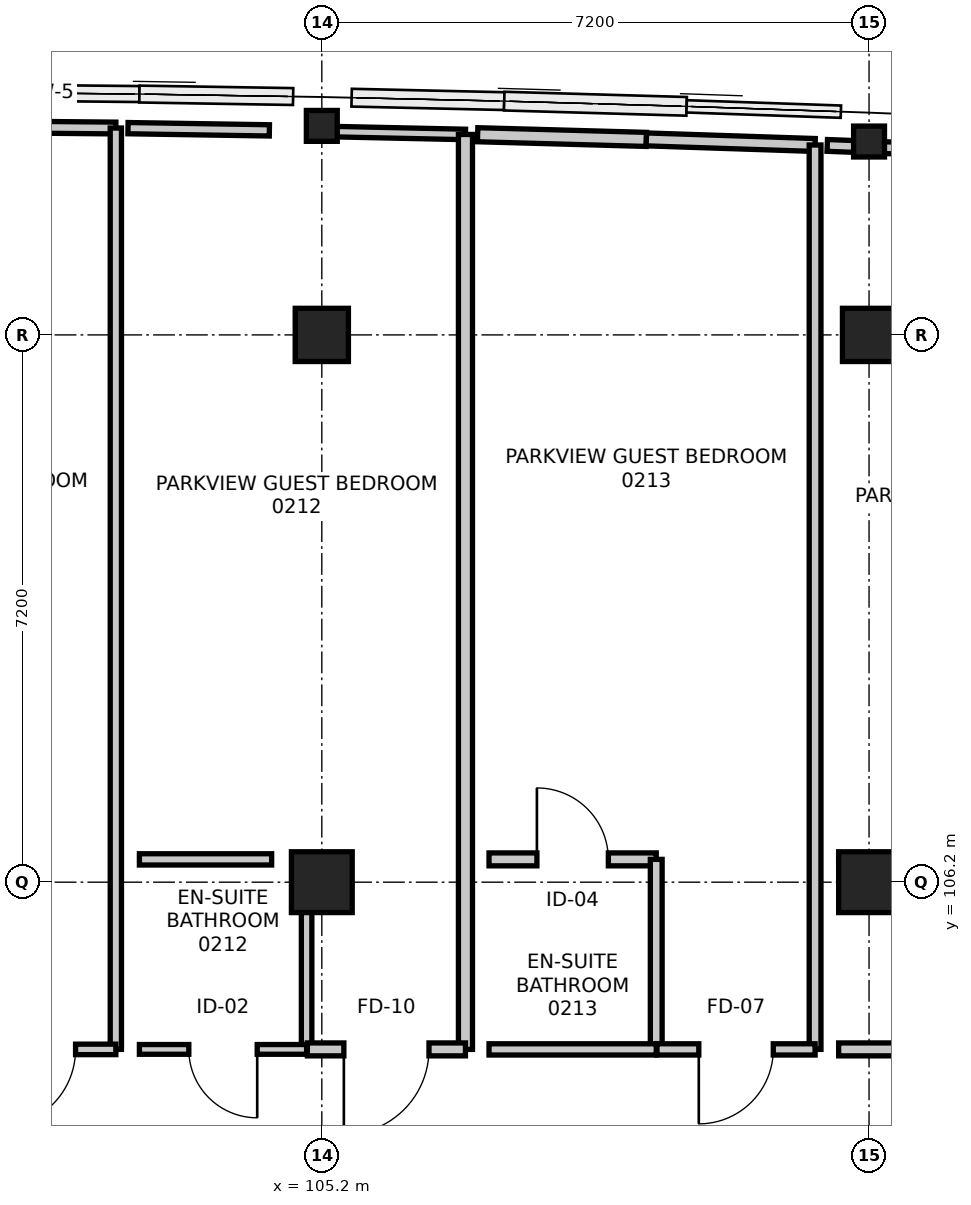
"""IFC4 building model, lengths in metres.
Left out: names, types, materials, properties, quantities, classifications, styles, units other than length and angle.
Written with IfcOpenShell. Run it as: python <this file> out.ifc"""

import sys

from ifc_helpers import new_model, si_unit, direction, frame, frame_2d, origin, origin_2d, place, context, subcontext, project, spatial, rectangle, hollow_circle, extrude, element, fill, save


model = new_model("IFC4")
c1 = context("Model", 3, precision=1e-05, world=origin(), true_north=direction((0.0, 1.0)))
c2 = subcontext(c1, "Body", "Model", "MODEL_VIEW")
j1 = project(units=[si_unit("LENGTHUNIT", "METRE"), si_unit("PLANEANGLEUNIT", "RADIAN")], contexts=[c1])
p1 = place(None, origin())
s1 = spatial("IfcSite", under=j1, at=p1, CompositionType="ELEMENT")
p2 = place(p1, origin())
s2 = spatial("IfcBuilding", under=s1, at=p2, CompositionType="ELEMENT")
p3 = place(p2, frame((0.0, 0.0, 10.5)))
s3 = spatial("IfcBuildingStorey", under=s2, at=p3, CompositionType="ELEMENT", Elevation=10.5)
p4 = place(p3, frame((105.2, 106.2, 0.0), z_axis=(0.0, 0.0, 1.0), x_axis=(1.0, 0.0, 0.0)))
e1 = element("IfcColumn", 1, at=p4, inside=s3, PredefinedType="COLUMN", context=c2, shape_type="SweptSolid", body=[
    extrude(rectangle(XDim=0.8, YDim=0.8, at=origin_2d()), origin(), (0.0, 0.0, 1.0), 4.5),
])
p5 = place(p3, frame((105.2, 113.4, 0.0), z_axis=(0.0, 0.0, 1.0), x_axis=(1.0, 0.0, 0.0)))
e2 = element("IfcColumn", 2, at=p5, inside=s3, PredefinedType="COLUMN", context=c2, shape_type="SweptSolid", body=[
    extrude(rectangle(XDim=0.7, YDim=0.7, at=origin_2d()), origin(), (0.0, 0.0, 1.0), 4.5),
])
p6 = place(p3, frame((105.2, 116.15, 0.0), z_axis=(0.0, 0.0, 1.0), x_axis=(1.0, 0.0, 0.0)))
e3 = element("IfcColumn", 3, at=p6, inside=s3, PredefinedType="COLUMN", context=c2, shape_type="SweptSolid", body=[
    extrude(hollow_circle(Radius=0.203, WallThickness=0.02, at=origin_2d()), origin(), (0.0, 0.0, 1.0), 4.5),
])
p7 = place(p3, frame((112.4, 106.2, -0.32), z_axis=(0.0, 0.0, 1.0), x_axis=(1.0, 0.0, 0.0)))
e4 = element("IfcColumn", 4, at=p7, inside=s3, PredefinedType="COLUMN", context=c2, shape_type="SweptSolid", body=[
    extrude(rectangle(XDim=0.8, YDim=0.8, at=origin_2d()), origin(), (0.0, 0.0, 1.0), 4.82),
])
p8 = place(p3, frame((112.4, 113.4, 0.0), z_axis=(0.0, 0.0, 1.0), x_axis=(1.0, 0.0, 0.0)))
e5 = element("IfcColumn", 5, at=p8, inside=s3, PredefinedType="COLUMN", context=c2, shape_type="SweptSolid", body=[
    extrude(rectangle(XDim=0.7, YDim=0.7, at=origin_2d()), origin(), (0.0, 0.0, 1.0), 4.5),
])
p9 = place(p3, frame((112.4, 115.944, 0.0), z_axis=(0.0, 0.0, 1.0), x_axis=(1.0, 0.0, 0.0)))
e6 = element("IfcColumn", 6, at=p9, inside=s3, PredefinedType="COLUMN", context=c2, shape_type="SweptSolid", body=[
    extrude(hollow_circle(Radius=0.203, WallThickness=0.02, at=origin_2d()), origin(), (0.0, 0.0, 1.0), 4.5),
])
p10 = place(p3, frame((100.27, 116.143, 0.0), z_axis=(0.0, 0.0, 1.0), x_axis=(0.999956311713, -0.009347441603, 0.0)))
e7 = element("IfcWall", 7, at=p10, inside=s3, PredefinedType="PARTITIONING", context=c2, shape_type="SweptSolid", body=[
    extrude(rectangle(XDim=2.22, YDim=0.155, at=frame_2d((1.11, 0.0))), origin(), (0.0, 0.0, 1.0), 3.796),
])
p11 = place(p3, frame((102.49, 116.122, 0.0), z_axis=(0.0, 0.0, 1.0), x_axis=(0.0, -1.0, 0.0)))
e8 = element("IfcWall", 8, at=p11, inside=s3, PredefinedType="PARTITIONING", context=c2, shape_type="SweptSolid", body=[
    extrude(rectangle(XDim=12.122, YDim=0.148, at=frame_2d((6.061, 0.0))), origin(), (0.0, 0.0, 1.0), 3.455),
])
p12 = place(p3, frame((102.49, 104.0, 0.0), z_axis=(0.0, 0.0, 1.0), x_axis=(-1.0, 0.0, 0.0)))
e9 = element("IfcWall", 9, at=p12, inside=s3, PredefinedType="PARTITIONING", context=c2, shape_type="SweptSolid", body=[
    extrude(rectangle(XDim=2.08, YDim=0.138, at=frame_2d((1.04, 0.0))), origin(), (0.0, 0.0, 1.0), 4.22),
])
p13 = place(p12, frame((0.53, 0.0, 0.0)))
e10 = element("IfcOpeningElement", 10, at=p13, cuts=e9, PredefinedType="OPENING", context=c2, shape_type="SweptSolid", body=[
    extrude(rectangle(XDim=1.02, YDim=2.15, at=frame_2d((0.51, 1.075))), frame((0.0, 0.079, 0.0), z_axis=(0.0, -1.0, 0.0), x_axis=(1.0, 0.0, 0.0)), (0.0, 0.0, 1.0), 0.158),
])
p14 = place(p3, frame((102.8, 106.5, 0.0), z_axis=(0.0, 0.0, 1.0), x_axis=(1.0, 0.0, 0.0)))
e11 = element("IfcWall", 11, at=p14, inside=s3, PredefinedType="PARTITIONING", context=c2, shape_type="SweptSolid", body=[
    extrude(rectangle(XDim=1.74, YDim=0.148, at=frame_2d((0.87, 0.0))), origin(), (0.0, 0.0, 1.0), 3.455),
])
p15 = place(p3, frame((105.0, 106.04, 0.0), z_axis=(0.0, 0.0, 1.0), x_axis=(0.0, -1.0, 0.0)))
e12 = element("IfcWall", 12, at=p15, inside=s3, PredefinedType="PARTITIONING", context=c2, shape_type="SweptSolid", body=[
    extrude(rectangle(XDim=2.04, YDim=0.138, at=frame_2d((1.02, 0.0))), origin(), (0.0, 0.0, 1.0), 3.555),
])
p16 = place(p3, frame((105.0, 104.0, 0.0), z_axis=(0.0, 0.0, 1.0), x_axis=(-1.0, 0.0, 0.0)))
e13 = element("IfcWall", 13, at=p16, inside=s3, PredefinedType="PARTITIONING", context=c2, shape_type="SweptSolid", body=[
    extrude(rectangle(XDim=2.2, YDim=0.128, at=frame_2d((1.1, 0.0))), origin(), (0.0, 0.0, 1.0), 3.555),
])
p17 = place(p16, frame((0.65, 0.0, 0.0)))
e14 = element("IfcOpeningElement", 14, at=p17, cuts=e13, PredefinedType="OPENING", context=c2, shape_type="SweptSolid", body=[
    extrude(rectangle(XDim=0.9, YDim=2.08, at=frame_2d((0.45, 1.04))), frame((0.0, 0.074, 0.0), z_axis=(0.0, -1.0, 0.0), x_axis=(1.0, 0.0, 0.0)), (0.0, 0.0, 1.0), 0.148),
])
p18 = place(p3, frame((102.65, 116.12, 0.0), z_axis=(0.0, 0.0, 1.0), x_axis=(0.999875990271, -0.015748145273, 0.0)))
e15 = element("IfcWall", 15, at=p18, inside=s3, PredefinedType="PARTITIONING", context=c2, shape_type="SweptSolid", body=[
    extrude(rectangle(XDim=1.86, YDim=0.148, at=frame_2d((0.93, 0.0))), origin(), (0.0, 0.0, 1.0), 3.796),
])
p19 = place(p3, frame((105.23, 116.077, 0.0), z_axis=(0.0, 0.0, 1.0), x_axis=(0.99976558294, -0.021651308726, 0.0)))
e16 = element("IfcWall", 16, at=p19, inside=s3, PredefinedType="PARTITIONING", context=c2, shape_type="SweptSolid", body=[
    extrude(rectangle(XDim=1.861, YDim=0.138, at=frame_2d((0.93, 0.0))), origin(), (0.0, 0.0, 1.0), 3.796),
])
p20 = place(p3, frame((107.09, 116.037, 0.0), z_axis=(0.0, 0.0, 1.0), x_axis=(0.0, -1.0, 0.0)))
e17 = element("IfcWall", 17, at=p20, inside=s3, PredefinedType="PARTITIONING", context=c2, shape_type="SweptSolid", body=[
    extrude(rectangle(XDim=12.037, YDim=0.185, at=frame_2d((6.019, 0.0))), origin(), (0.0, 0.0, 1.0), 3.455),
])
p21 = place(p3, frame((107.09, 104.0, 0.0), z_axis=(0.0, 0.0, 1.0), x_axis=(-1.0, 0.0, 0.0)))
e18 = element("IfcWall", 18, at=p21, inside=s3, PredefinedType="PARTITIONING", context=c2, shape_type="SweptSolid", body=[
    extrude(rectangle(XDim=2.08, YDim=0.17, at=frame_2d((1.04, 0.0))), origin(), (0.0, 0.0, 1.0), 3.555),
])
p22 = place(p21, frame((0.48, 0.0, 0.0)))
e19 = element("IfcOpeningElement", 19, at=p22, cuts=e18, PredefinedType="OPENING", context=c2, shape_type="SweptSolid", body=[
    extrude(rectangle(XDim=1.12, YDim=2.2, at=frame_2d((0.56, 1.1))), frame((0.0, 0.095, 0.0), z_axis=(0.0, -1.0, 0.0), x_axis=(1.0, 0.0, 0.0)), (0.0, 0.0, 1.0), 0.19),
])
p23 = place(p3, frame((107.4, 106.5, 0.0), z_axis=(0.0, 0.0, 1.0), x_axis=(1.0, 0.0, 0.0)))
e20 = element("IfcWall", 20, at=p23, inside=s3, PredefinedType="PARTITIONING", context=c2, shape_type="SweptSolid", body=[
    extrude(rectangle(XDim=2.2, YDim=0.17, at=frame_2d((1.1, 0.0))), origin(), (0.0, 0.0, 1.0), 3.455),
])
p24 = place(p23, frame((0.63, 0.0, 0.0)))
e21 = element("IfcOpeningElement", 21, at=p24, cuts=e20, PredefinedType="OPENING", context=c2, shape_type="SweptSolid", body=[
    extrude(rectangle(XDim=0.94, YDim=2.12, at=frame_2d((0.47, 1.06))), frame((0.0, 0.095, 0.0), z_axis=(0.0, -1.0, 0.0), x_axis=(1.0, 0.0, 0.0)), (0.0, 0.0, 1.0), 0.19),
])
p25 = place(p3, frame((109.6, 106.5, 0.0), z_axis=(0.0, 0.0, 1.0), x_axis=(0.0, -1.0, 0.0)))
e22 = element("IfcWall", 22, at=p25, inside=s3, PredefinedType="PARTITIONING", context=c2, shape_type="SweptSolid", body=[
    extrude(rectangle(XDim=2.5, YDim=0.155, at=frame_2d((1.25, 0.0))), origin(), (0.0, 0.0, 1.0), 3.455),
])
p26 = place(p3, frame((109.6, 104.0, 0.0), z_axis=(0.0, 0.0, 1.0), x_axis=(-1.0, 0.0, 0.0)))
e23 = element("IfcWall", 23, at=p26, inside=s3, PredefinedType="PARTITIONING", context=c2, shape_type="SweptSolid", body=[
    extrude(rectangle(XDim=2.2, YDim=0.148, at=frame_2d((1.1, 0.0))), origin(), (0.0, 0.0, 1.0), 4.22),
])
p27 = place(p3, frame((107.25, 116.034, 0.0), z_axis=(0.0, 0.0, 1.0), x_axis=(0.999616198539, -0.027702989336, 0.0)))
e24 = element("IfcWall", 24, at=p27, inside=s3, PredefinedType="PARTITIONING", context=c2, shape_type="SweptSolid", body=[
    extrude(rectangle(XDim=2.221, YDim=0.185, at=frame_2d((1.11, 0.0))), origin(), (0.0, 0.0, 1.0), 3.796),
])
p28 = place(p3, frame((109.47, 115.972, 0.0), z_axis=(0.0, 0.0, 1.0), x_axis=(0.999448925393, -0.033194058668, 0.0)))
e25 = element("IfcWall", 25, at=p28, inside=s3, PredefinedType="PARTITIONING", context=c2, shape_type="SweptSolid", body=[
    extrude(rectangle(XDim=2.221, YDim=0.17, at=frame_2d((1.111, 0.0))), origin(), (0.0, 0.0, 1.0), 3.796),
])
p29 = place(p3, frame((111.69, 115.898, 0.0), z_axis=(0.0, 0.0, 1.0), x_axis=(0.0, -1.0, 0.0)))
e26 = element("IfcWall", 26, at=p29, inside=s3, PredefinedType="PARTITIONING", context=c2, shape_type="SweptSolid", body=[
    extrude(rectangle(XDim=11.898, YDim=0.155, at=frame_2d((5.949, 0.0))), origin(), (0.0, 0.0, 1.0), 3.455),
])
p30 = place(p3, frame((111.69, 104.0, 0.0), z_axis=(0.0, 0.0, 1.0), x_axis=(-1.0, 0.0, 0.0)))
e27 = element("IfcWall", 27, at=p30, inside=s3, PredefinedType="PARTITIONING", context=c2, shape_type="SweptSolid", body=[
    extrude(rectangle(XDim=2.08, YDim=0.148, at=frame_2d((1.04, 0.0))), origin(), (0.0, 0.0, 1.0), 4.22),
])
p31 = place(p30, frame((0.55, 0.0, 0.0)))
e28 = element("IfcOpeningElement", 28, at=p31, cuts=e27, PredefinedType="OPENING", context=c2, shape_type="SweptSolid", body=[
    extrude(rectangle(XDim=0.98, YDim=2.15, at=frame_2d((0.49, 1.075))), frame((0.0, 0.084, 0.0), z_axis=(0.0, -1.0, 0.0), x_axis=(1.0, 0.0, 0.0)), (0.0, 0.0, 1.0), 0.168),
])
p32 = place(p3, frame((112.0, 106.5, 0.0), z_axis=(0.0, 0.0, 1.0), x_axis=(1.0, 0.0, 0.0)))
e29 = element("IfcWall", 29, at=p32, inside=s3, PredefinedType="PARTITIONING", context=c2, shape_type="SweptSolid", body=[
    extrude(rectangle(XDim=2.2, YDim=0.098, at=frame_2d((1.1, 0.0))), origin(), (0.0, 0.0, 1.0), 3.455),
])
p33 = place(p3, frame((114.2, 104.0, 0.0), z_axis=(0.0, 0.0, 1.0), x_axis=(-1.0, 0.0, 0.0)))
e30 = element("IfcWall", 30, at=p33, inside=s3, PredefinedType="PARTITIONING", context=c2, shape_type="SweptSolid", body=[
    extrude(rectangle(XDim=2.2, YDim=0.17, at=frame_2d((1.1, 0.0))), origin(), (0.0, 0.0, 1.0), 3.555),
])
p34 = place(p3, frame((111.85, 115.893, 0.0), z_axis=(0.0, 0.0, 1.0), x_axis=(0.999247312878, -0.038791851033, 0.0)))
e31 = element("IfcWall", 31, at=p34, inside=s3, PredefinedType="PARTITIONING", context=c2, shape_type="SweptSolid", body=[
    extrude(rectangle(XDim=2.222, YDim=0.155, at=frame_2d((1.111, 0.0))), origin(), (0.0, 0.0, 1.0), 3.796),
])
p35 = place(p13, origin())
e32 = element("IfcDoor", 32, at=p35, inside=s3, OperationType="SINGLE_SWING_RIGHT", PredefinedType="DOOR", context=c2, shape_type="SweptSolid", body=[
    extrude(rectangle(XDim=1.02, YDim=2.15, at=frame_2d((0.51, 1.075))), frame((0.0, 0.025, 0.0), z_axis=(0.0, -1.0, 0.0), x_axis=(1.0, 0.0, 0.0)), (0.0, 0.0, 1.0), 0.05),
])
fill(e10, e32)
p36 = place(p17, origin())
e33 = element("IfcDoor", 33, at=p36, inside=s3, OperationType="SINGLE_SWING_LEFT", PredefinedType="DOOR", context=c2, shape_type="SweptSolid", body=[
    extrude(rectangle(XDim=0.9, YDim=2.08, at=frame_2d((0.45, 1.04))), frame((0.0, 0.025, 0.0), z_axis=(0.0, -1.0, 0.0), x_axis=(1.0, 0.0, 0.0)), (0.0, 0.0, 1.0), 0.05),
])
fill(e14, e33)
p37 = place(p22, origin())
e34 = element("IfcDoor", 34, at=p37, inside=s3, OperationType="SINGLE_SWING_RIGHT", PredefinedType="DOOR", context=c2, shape_type="SweptSolid", body=[
    extrude(rectangle(XDim=1.12, YDim=2.2, at=frame_2d((0.56, 1.1))), frame((0.0, 0.025, 0.0), z_axis=(0.0, -1.0, 0.0), x_axis=(1.0, 0.0, 0.0)), (0.0, 0.0, 1.0), 0.05),
])
fill(e19, e34)
p38 = place(p24, origin())
e35 = element("IfcDoor", 35, at=p38, inside=s3, OperationType="SINGLE_SWING_LEFT", PredefinedType="DOOR", context=c2, shape_type="SweptSolid", body=[
    extrude(rectangle(XDim=0.94, YDim=2.12, at=frame_2d((0.47, 1.06))), frame((0.0, 0.025, 0.0), z_axis=(0.0, -1.0, 0.0), x_axis=(1.0, 0.0, 0.0)), (0.0, 0.0, 1.0), 0.05),
])
fill(e21, e35)
p39 = place(p31, origin())
e36 = element("IfcDoor", 36, at=p39, inside=s3, OperationType="SINGLE_SWING_RIGHT", PredefinedType="DOOR", context=c2, shape_type="SweptSolid", body=[
    extrude(rectangle(XDim=0.98, YDim=2.15, at=frame_2d((0.49, 1.075))), frame((0.0, 0.025, 0.0), z_axis=(0.0, -1.0, 0.0), x_axis=(1.0, 0.0, 0.0)), (0.0, 0.0, 1.0), 0.05),
])
fill(e28, e36)
save(model, sys.argv[1])
